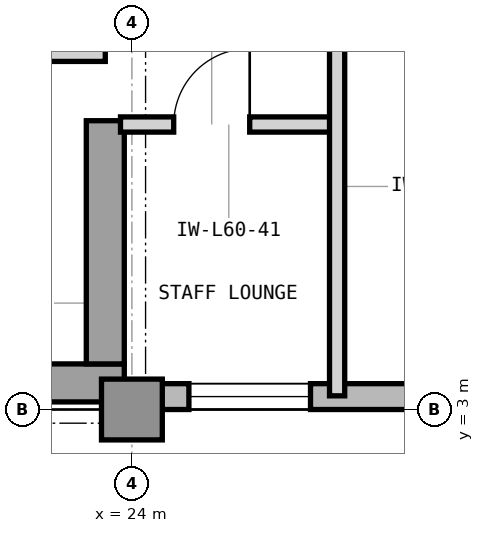
"""IFC4 building model, lengths in metres.
Left out: names, types, materials, properties, quantities, classifications, styles, units other than length and angle.
Written with IfcOpenShell. Run it as: python <this file> out.ifc"""

import sys

from ifc_helpers import new_model, si_unit, direction, frame, frame_2d, origin, origin_2d, place, context, subcontext, project, spatial, rectangle, extrude, element, fill, save


model = new_model("IFC4")
c1 = context("Model", 3, precision=1e-05, world=origin(), true_north=direction((0.0, 1.0)))
c2 = subcontext(c1, "Body", "Model", "MODEL_VIEW")
j1 = project(units=[si_unit("LENGTHUNIT", "METRE"), si_unit("PLANEANGLEUNIT", "RADIAN")], contexts=[c1])
p1 = place(None, origin())
s1 = spatial("IfcSite", under=j1, at=p1, CompositionType="ELEMENT")
p2 = place(p1, origin())
s2 = spatial("IfcBuilding", under=s1, at=p2, CompositionType="ELEMENT")
p3 = place(p2, frame((0.0, 0.0, 246.9)))
s3 = spatial("IfcBuildingStorey", under=s2, at=p3, CompositionType="ELEMENT", Elevation=246.9)
p4 = place(p3, frame((7.475, 3.35, 0.0), z_axis=(0.0, 0.0, 1.0), x_axis=(1.0, 0.0, 0.0)))
e1 = element("IfcWall", 1, at=p4, inside=s3, PredefinedType="SHEAR", context=c2, shape_type="SweptSolid", body=[
    extrude(rectangle(XDim=16.425, YDim=0.5, at=frame_2d((8.212, 0.0))), origin(), (0.0, 0.0, 1.0), 3.9),
])
p5 = place(p3, frame((23.65, 3.6, 0.0), z_axis=(0.0, 0.0, 1.0), x_axis=(0.0, 1.0, 0.0)))
e2 = element("IfcWall", 2, at=p5, inside=s3, PredefinedType="SHEAR", context=c2, shape_type="SweptSolid", body=[
    extrude(rectangle(XDim=3.2, YDim=0.5, at=frame_2d((1.6, 0.0))), origin(), (0.0, 0.0, 1.0), 3.9),
])
p6 = place(p3, frame((24.0, 3.0, 0.0), z_axis=(0.0, 0.0, 1.0), x_axis=(1.0, 0.0, 0.0)))
e3 = element("IfcColumn", 3, at=p6, inside=s3, PredefinedType="COLUMN", context=c2, shape_type="SweptSolid", body=[
    extrude(rectangle(XDim=0.8, YDim=0.8, at=origin_2d()), origin(), (0.0, 0.0, 1.0), 3.9),
])
p7 = place(p3, frame((23.9, 3.17, 0.0), z_axis=(0.0, 0.0, 1.0), x_axis=(1.0, 0.0, 0.0)))
e4 = element("IfcWall", 4, at=p7, inside=s3, PredefinedType="STANDARD", context=c2, shape_type="SweptSolid", body=[
    extrude(rectangle(XDim=28.5, YDim=0.34, at=frame_2d((14.25, 0.0))), origin(), (0.0, 0.0, 1.0), 3.7),
])
p8 = place(p7, frame((10.725, 0.0, 0.9)))
e5 = element("IfcOpeningElement", 5, at=p8, cuts=e4, PredefinedType="OPENING", context=c2, shape_type="SweptSolid", body=[
    extrude(rectangle(XDim=2.3, YDim=2.2, at=frame_2d((1.15, 1.1))), frame((0.0, 0.18, 0.0), z_axis=(0.0, -1.0, 0.0), x_axis=(1.0, 0.0, 0.0)), (0.0, 0.0, 1.0), 0.36),
])
p9 = place(p7, frame((0.85, 0.0, 0.9)))
e6 = element("IfcOpeningElement", 6, at=p9, cuts=e4, PredefinedType="OPENING", context=c2, shape_type="SweptSolid", body=[
    extrude(rectangle(XDim=1.6, YDim=2.2, at=frame_2d((0.8, 1.1))), frame((0.0, 0.18, 0.0), z_axis=(0.0, -1.0, 0.0), x_axis=(1.0, 0.0, 0.0)), (0.0, 0.0, 1.0), 0.36),
])
p10 = place(p7, frame((19.075, 0.0, 0.9)))
e7 = element("IfcOpeningElement", 7, at=p10, cuts=e4, PredefinedType="OPENING", context=c2, shape_type="SweptSolid", body=[
    extrude(rectangle(XDim=2.3, YDim=2.2, at=frame_2d((1.15, 1.1))), frame((0.0, 0.18, 0.0), z_axis=(0.0, -1.0, 0.0), x_axis=(1.0, 0.0, 0.0)), (0.0, 0.0, 1.0), 0.36),
])
p11 = place(p3, frame((20.55, 7.68, 0.0), z_axis=(0.0, 0.0, 1.0), x_axis=(1.0, 0.0, 0.0)))
e8 = element("IfcWall", 8, at=p11, inside=s3, PredefinedType="PARTITIONING", context=c2, shape_type="SweptSolid", body=[
    extrude(rectangle(XDim=3.1, YDim=0.2, at=frame_2d((1.55, 0.0))), origin(), (0.0, 0.0, 1.0), 3.69),
])
p12 = place(p11, frame((1.075, 0.0, 0.0)))
e9 = element("IfcOpeningElement", 9, at=p12, cuts=e8, PredefinedType="OPENING", context=c2, shape_type="SweptSolid", body=[
    extrude(rectangle(XDim=0.95, YDim=2.1, at=frame_2d((0.475, 1.05))), frame((0.0, 0.11, 0.0), z_axis=(0.0, -1.0, 0.0), x_axis=(1.0, 0.0, 0.0)), (0.0, 0.0, 1.0), 0.22),
])
p13 = place(p3, frame((23.85, 6.75, 0.0), z_axis=(0.0, 0.0, 1.0), x_axis=(1.0, 0.0, 0.0)))
e10 = element("IfcWall", 10, at=p13, inside=s3, PredefinedType="PARTITIONING", context=c2, shape_type="SweptSolid", body=[
    extrude(rectangle(XDim=2.85, YDim=0.2, at=frame_2d((1.425, 0.0))), origin(), (0.0, 0.0, 1.0), 3.69),
])
p14 = place(p13, frame((0.7, 0.0, 0.0)))
e11 = element("IfcOpeningElement", 11, at=p14, cuts=e10, PredefinedType="OPENING", context=c2, shape_type="SweptSolid", body=[
    extrude(rectangle(XDim=1.0, YDim=2.15, at=frame_2d((0.5, 1.075))), frame((0.0, 0.11, 0.0), z_axis=(0.0, -1.0, 0.0), x_axis=(1.0, 0.0, 0.0)), (0.0, 0.0, 1.0), 0.22),
])
p15 = place(p3, frame((26.7, 3.18, 0.0), z_axis=(0.0, 0.0, 1.0), x_axis=(0.0, 1.0, 0.0)))
e12 = element("IfcWall", 12, at=p15, inside=s3, PredefinedType="PARTITIONING", context=c2, shape_type="SweptSolid", body=[
    extrude(rectangle(XDim=11.02, YDim=0.2, at=frame_2d((5.51, 0.0))), origin(), (0.0, 0.0, 1.0), 3.69),
])
p16 = place(p14, origin())
e13 = element("IfcDoor", 13, at=p16, inside=s3, OperationType="SINGLE_SWING_RIGHT", PredefinedType="DOOR", context=c2, shape_type="SweptSolid", body=[
    extrude(rectangle(XDim=1.0, YDim=2.15, at=frame_2d((0.5, 1.075))), frame((0.0, 0.025, 0.0), z_axis=(0.0, -1.0, 0.0), x_axis=(1.0, 0.0, 0.0)), (0.0, 0.0, 1.0), 0.05),
])
fill(e11, e13)
p17 = place(p9, origin())
e14 = element("IfcWindow", 14, at=p17, inside=s3, PartitioningType="SINGLE_PANEL", PredefinedType="WINDOW", context=c2, shape_type="SweptSolid", body=[
    extrude(rectangle(XDim=1.6, YDim=2.2, at=frame_2d((0.8, 1.1))), frame((0.0, 0.11, 0.0), z_axis=(0.0, -1.0, 0.0), x_axis=(1.0, 0.0, 0.0)), (0.0, 0.0, 1.0), 0.06),
])
fill(e6, e14)
save(model, sys.argv[1])
